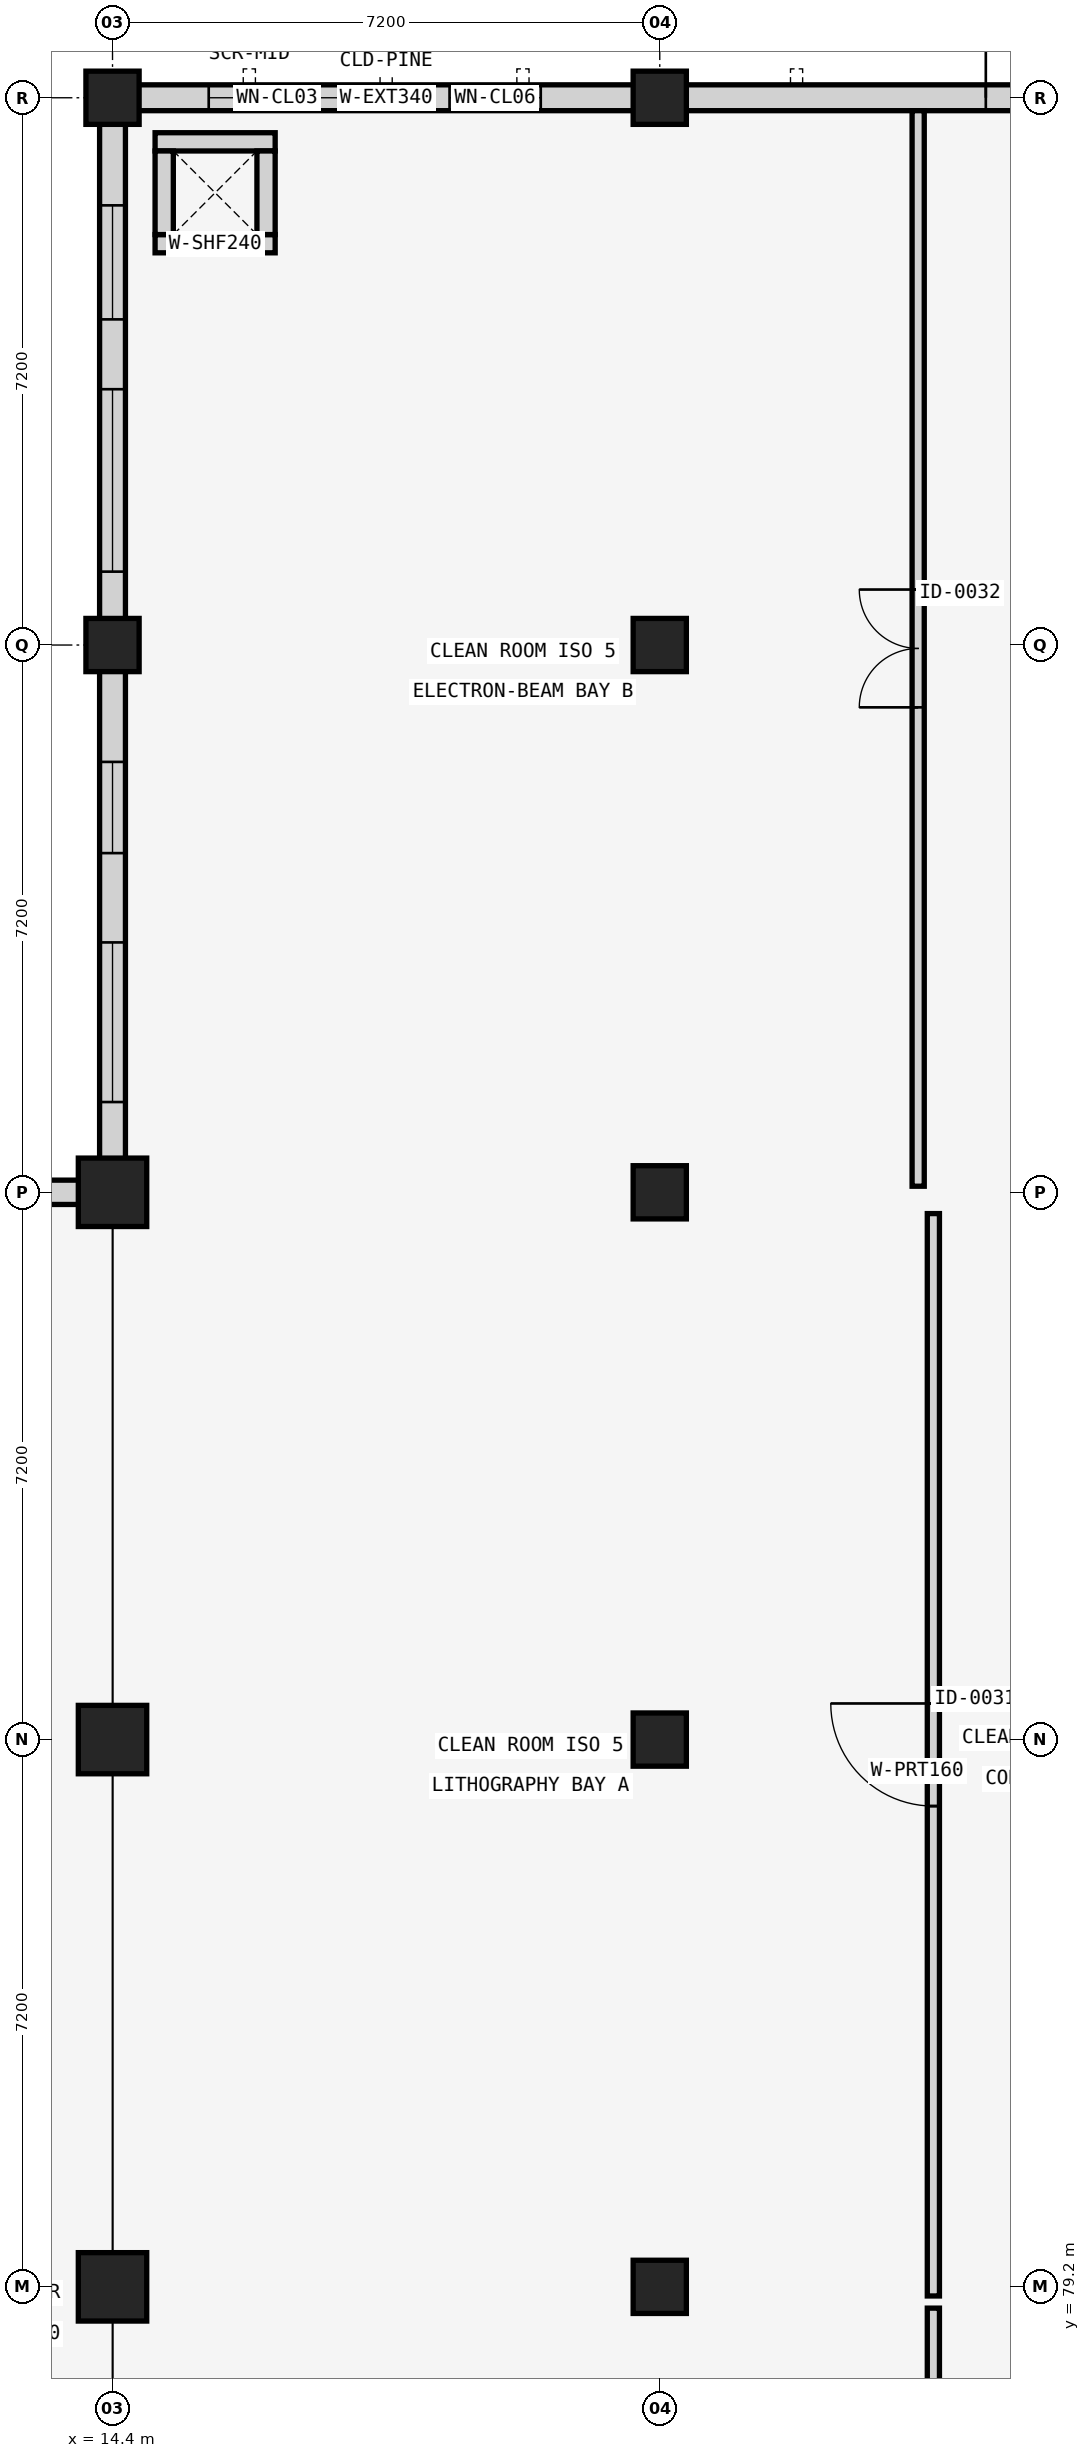
"""IFC4 building model, lengths in metres.
Left out: names, types, materials, properties, quantities, classifications, styles, units other than length and angle.
Written with IfcOpenShell. Run it as: python <this file> out.ifc"""

import sys

from ifc_helpers import new_model, si_unit, direction, frame, frame_2d, origin, origin_2d, place, context, subcontext, project, spatial, rectangle, extrude, element, fill, save


model = new_model("IFC4")
c1 = context("Model", 3, precision=1e-05, world=origin(), true_north=direction((0.0, 1.0)))
c2 = subcontext(c1, "Body", "Model", "MODEL_VIEW")
j1 = project(units=[si_unit("LENGTHUNIT", "METRE"), si_unit("PLANEANGLEUNIT", "RADIAN")], contexts=[c1])
p1 = place(None, origin())
s1 = spatial("IfcSite", under=j1, at=p1, CompositionType="ELEMENT")
p2 = place(p1, origin())
s2 = spatial("IfcBuilding", under=s1, at=p2, CompositionType="ELEMENT")
p3 = place(p2, origin())
s3 = spatial("IfcBuildingStorey", under=s2, at=p3, CompositionType="ELEMENT", Elevation=0.0)
for number, where, z_axis, x_axis in (
    (1, (14.4, 79.2, 0.0), (0.0, 0.0, 1.0), (1.0, 0.0, 0.0)),
    (2, (14.4, 86.4, 0.0), (0.0, 0.0, 1.0), (1.0, 0.0, 0.0)),
    (3, (14.4, 93.6, 0.0), (0.0, 0.0, 1.0), (1.0, 0.0, 0.0)),
):
    element("IfcColumn", number, at=place(p3, frame(where, z_axis=z_axis, x_axis=x_axis)), inside=s3, PredefinedType="COLUMN", context=c2, shape_type="SweptSolid", body=[
        extrude(rectangle(XDim=0.9, YDim=0.9, at=origin_2d()), origin(), (0.0, 0.0, 1.0), 4.8),
    ])
for number, where, z_axis, x_axis in (
    (4, (14.4, 100.8, 0.0), (0.0, 0.0, 1.0), (1.0, 0.0, 0.0)),
    (5, (14.4, 108.0, 0.0), (0.0, 0.0, 1.0), (1.0, 0.0, 0.0)),
    (6, (21.6, 79.2, 0.0), (0.0, 0.0, 1.0), (1.0, 0.0, 0.0)),
    (7, (21.6, 86.4, 0.0), (0.0, 0.0, 1.0), (1.0, 0.0, 0.0)),
    (8, (21.6, 93.6, 0.0), (0.0, 0.0, 1.0), (1.0, 0.0, 0.0)),
    (9, (21.6, 100.8, 0.0), (0.0, 0.0, 1.0), (1.0, 0.0, 0.0)),
    (10, (21.6, 108.0, 0.0), (0.0, 0.0, 1.0), (1.0, 0.0, 0.0)),
):
    element("IfcColumn", number, at=place(p3, frame(where, z_axis=z_axis, x_axis=x_axis)), inside=s3, PredefinedType="COLUMN", context=c2, shape_type="SweptSolid", body=[
        extrude(rectangle(XDim=0.7, YDim=0.7, at=origin_2d()), origin(), (0.0, 0.0, 1.0), 4.8),
    ])
p4 = place(p3, frame((1.8, 93.6, 0.0), z_axis=(0.0, 0.0, 1.0), x_axis=(1.0, 0.0, 0.0)))
e11 = element("IfcWall", 11, at=p4, inside=s3, PredefinedType="SOLIDWALL", context=c2, shape_type="SweptSolid", body=[
    extrude(rectangle(XDim=12.16, YDim=0.32, at=frame_2d((6.08, 0.0))), origin(), (0.0, 0.0, 1.0), 4.06),
])
p5 = place(p4, frame((2.975, 0.0, 0.9)))
e12 = element("IfcOpeningElement", 12, at=p5, cuts=e11, PredefinedType="OPENING", context=c2, shape_type="SweptSolid", body=[
    extrude(rectangle(XDim=0.45, YDim=2.4, at=frame_2d((0.225, 1.2))), frame((0.0, 0.17, 0.0), z_axis=(0.0, -1.0, 0.0), x_axis=(1.0, 0.0, 0.0)), (0.0, 0.0, 1.0), 0.34),
])
p6 = place(p4, frame((6.2, 0.0, 0.0)))
e13 = element("IfcOpeningElement", 13, at=p6, cuts=e11, PredefinedType="OPENING", context=c2, shape_type="SweptSolid", body=[
    extrude(rectangle(XDim=1.8, YDim=2.4, at=frame_2d((0.9, 1.2))), frame((0.0, 0.17, 0.0), z_axis=(0.0, -1.0, 0.0), x_axis=(1.0, 0.0, 0.0)), (0.0, 0.0, 1.0), 0.34),
])
p7 = place(p3, frame((14.74, 108.0, 0.0), z_axis=(0.0, 0.0, 1.0), x_axis=(1.0, 0.0, 0.0)))
e14 = element("IfcWall", 14, at=p7, inside=s3, PredefinedType="SOLIDWALL", context=c2, shape_type="SweptSolid", body=[
    extrude(rectangle(XDim=6.52, YDim=0.34, at=frame_2d((3.26, 0.0))), origin(), (0.0, 0.0, 1.0), 3.75),
])
p8 = place(p7, frame((0.926, 0.0, 1.0)))
e15 = element("IfcOpeningElement", 15, at=p8, cuts=e14, PredefinedType="OPENING", context=c2, shape_type="SweptSolid", body=[
    extrude(rectangle(XDim=1.8, YDim=1.5, at=frame_2d((0.9, 0.75))), frame((0.0, 0.18, 0.0), z_axis=(0.0, -1.0, 0.0), x_axis=(1.0, 0.0, 0.0)), (0.0, 0.0, 1.0), 0.36),
])
p9 = place(p7, frame((4.094, 0.0, 1.0)))
e16 = element("IfcOpeningElement", 16, at=p9, cuts=e14, PredefinedType="OPENING", context=c2, shape_type="SweptSolid", body=[
    extrude(rectangle(XDim=1.2, YDim=1.65, at=frame_2d((0.6, 0.825))), frame((0.0, 0.18, 0.0), z_axis=(0.0, -1.0, 0.0), x_axis=(1.0, 0.0, 0.0)), (0.0, 0.0, 1.0), 0.36),
])
p10 = place(p3, frame((21.94, 108.0, 0.0), z_axis=(0.0, 0.0, 1.0), x_axis=(1.0, 0.0, 0.0)))
e17 = element("IfcWall", 17, at=p10, inside=s3, PredefinedType="SOLIDWALL", context=c2, shape_type="SweptSolid", body=[
    extrude(rectangle(XDim=6.52, YDim=0.34, at=frame_2d((3.26, 0.0))), origin(), (0.0, 0.0, 1.0), 3.75),
])
p11 = place(p10, frame((3.95, 0.0, 0.0)))
e18 = element("IfcOpeningElement", 18, at=p11, cuts=e17, PredefinedType="OPENING", context=c2, shape_type="SweptSolid", body=[
    extrude(rectangle(XDim=1.8, YDim=2.4, at=frame_2d((0.9, 1.2))), frame((0.0, 0.18, 0.0), z_axis=(0.0, -1.0, 0.0), x_axis=(1.0, 0.0, 0.0)), (0.0, 0.0, 1.0), 0.36),
])
p12 = place(p3, frame((14.4, 94.04, 0.0), z_axis=(0.0, 0.0, 1.0), x_axis=(0.0, 1.0, 0.0)))
e19 = element("IfcWall", 19, at=p12, inside=s3, PredefinedType="SOLIDWALL", context=c2, shape_type="SweptSolid", body=[
    extrude(rectangle(XDim=6.42, YDim=0.34, at=frame_2d((3.21, 0.0))), origin(), (0.0, 0.0, 1.0), 3.85),
])
p13 = place(p12, frame((0.748, 0.0, 1.0)))
e20 = element("IfcOpeningElement", 20, at=p13, cuts=e19, PredefinedType="OPENING", context=c2, shape_type="SweptSolid", body=[
    extrude(rectangle(XDim=2.1, YDim=1.5, at=frame_2d((1.05, 0.75))), frame((0.0, 0.18, 0.0), z_axis=(0.0, -1.0, 0.0), x_axis=(1.0, 0.0, 0.0)), (0.0, 0.0, 1.0), 0.36),
])
p14 = place(p12, frame((4.022, 0.0, 1.0)))
e21 = element("IfcOpeningElement", 21, at=p14, cuts=e19, PredefinedType="OPENING", context=c2, shape_type="SweptSolid", body=[
    extrude(rectangle(XDim=1.2, YDim=1.65, at=frame_2d((0.6, 0.825))), frame((0.0, 0.18, 0.0), z_axis=(0.0, -1.0, 0.0), x_axis=(1.0, 0.0, 0.0)), (0.0, 0.0, 1.0), 0.36),
])
p15 = place(p3, frame((14.4, 101.14, 0.0), z_axis=(0.0, 0.0, 1.0), x_axis=(0.0, 1.0, 0.0)))
e22 = element("IfcWall", 22, at=p15, inside=s3, PredefinedType="SOLIDWALL", context=c2, shape_type="SweptSolid", body=[
    extrude(rectangle(XDim=6.52, YDim=0.34, at=frame_2d((3.26, 0.0))), origin(), (0.0, 0.0, 1.0), 3.85),
])
p16 = place(p15, frame((0.625, 0.0, 1.0)))
e23 = element("IfcOpeningElement", 23, at=p16, cuts=e22, PredefinedType="OPENING", context=c2, shape_type="SweptSolid", body=[
    extrude(rectangle(XDim=2.4, YDim=1.5, at=frame_2d((1.2, 0.75))), frame((0.0, 0.18, 0.0), z_axis=(0.0, -1.0, 0.0), x_axis=(1.0, 0.0, 0.0)), (0.0, 0.0, 1.0), 0.36),
])
p17 = place(p15, frame((3.944, 0.0, 1.0)))
e24 = element("IfcOpeningElement", 24, at=p17, cuts=e22, PredefinedType="OPENING", context=c2, shape_type="SweptSolid", body=[
    extrude(rectangle(XDim=1.5, YDim=1.65, at=frame_2d((0.75, 0.825))), frame((0.0, 0.18, 0.0), z_axis=(0.0, -1.0, 0.0), x_axis=(1.0, 0.0, 0.0)), (0.0, 0.0, 1.0), 0.36),
])
p18 = place(p3, frame((25.2, 65.08, 0.0), z_axis=(0.0, 0.0, 1.0), x_axis=(0.0, 1.0, 0.0)))
e25 = element("IfcWall", 25, at=p18, inside=s3, PredefinedType="PARTITIONING", context=c2, shape_type="SweptSolid", body=[
    extrude(rectangle(XDim=13.84, YDim=0.16, at=frame_2d((6.92, 0.0))), origin(), (0.0, 0.0, 1.0), 3.75),
])
p19 = place(p18, frame((6.32, 0.0, 0.0)))
e26 = element("IfcOpeningElement", 26, at=p19, cuts=e25, PredefinedType="OPENING", context=c2, shape_type="SweptSolid", body=[
    extrude(rectangle(XDim=1.2, YDim=2.15, at=frame_2d((0.6, 1.075))), frame((0.0, 0.09, 0.0), z_axis=(0.0, -1.0, 0.0), x_axis=(1.0, 0.0, 0.0)), (0.0, 0.0, 1.0), 0.18),
])
p20 = place(p3, frame((25.2, 79.08, 0.0), z_axis=(0.0, 0.0, 1.0), x_axis=(0.0, 1.0, 0.0)))
e27 = element("IfcWall", 27, at=p20, inside=s3, PredefinedType="PARTITIONING", context=c2, shape_type="SweptSolid", body=[
    extrude(rectangle(XDim=14.24, YDim=0.16, at=frame_2d((7.12, 0.0))), origin(), (0.0, 0.0, 1.0), 3.75),
])
p21 = place(p20, frame((6.445, 0.0, 0.0)))
e28 = element("IfcOpeningElement", 28, at=p21, cuts=e27, PredefinedType="OPENING", context=c2, shape_type="SweptSolid", body=[
    extrude(rectangle(XDim=1.35, YDim=2.2, at=frame_2d((0.675, 1.1))), frame((0.0, 0.09, 0.0), z_axis=(0.0, -1.0, 0.0), x_axis=(1.0, 0.0, 0.0)), (0.0, 0.0, 1.0), 0.18),
])
p22 = place(p3, frame((25.0, 93.68, 0.0), z_axis=(0.0, 0.0, 1.0), x_axis=(0.0, 1.0, 0.0)))
e29 = element("IfcWall", 29, at=p22, inside=s3, PredefinedType="PARTITIONING", context=c2, shape_type="SweptSolid", body=[
    extrude(rectangle(XDim=14.15, YDim=0.16, at=frame_2d((7.075, 0.0))), origin(), (0.0, 0.0, 1.0), 3.75),
])
p23 = place(p22, frame((6.3, 0.0, 0.0)))
e30 = element("IfcOpeningElement", 30, at=p23, cuts=e29, PredefinedType="OPENING", context=c2, shape_type="SweptSolid", body=[
    extrude(rectangle(XDim=1.55, YDim=2.25, at=frame_2d((0.775, 1.125))), frame((0.0, 0.09, 0.0), z_axis=(0.0, -1.0, 0.0), x_axis=(1.0, 0.0, 0.0)), (0.0, 0.0, 1.0), 0.18),
])
for number, where, z_axis, x_axis in (
    (31, (14.96, 106.08, 0.0), (0.0, 0.0, 1.0), (1.0, 0.0, 0.0)),
    (32, (14.96, 107.42, 0.0), (0.0, 0.0, 1.0), (1.0, 0.0, 0.0)),
):
    element("IfcWall", number, at=place(p3, frame(where, z_axis=z_axis, x_axis=x_axis)), inside=s3, PredefinedType="SOLIDWALL", context=c2, shape_type="SweptSolid", body=[
        extrude(rectangle(XDim=1.58, YDim=0.24, at=frame_2d((0.79, 0.0))), origin(), (0.0, 0.0, 1.0), 4.45),
    ])
for number, where, z_axis, x_axis in (
    (33, (15.08, 106.2, 0.0), (0.0, 0.0, 1.0), (0.0, 1.0, 0.0)),
    (34, (16.42, 106.2, 0.0), (0.0, 0.0, 1.0), (0.0, 1.0, 0.0)),
):
    element("IfcWall", number, at=place(p3, frame(where, z_axis=z_axis, x_axis=x_axis)), inside=s3, PredefinedType="SOLIDWALL", context=c2, shape_type="SweptSolid", body=[
        extrude(rectangle(XDim=1.1, YDim=0.24, at=frame_2d((0.55, 0.0))), origin(), (0.0, 0.0, 1.0), 4.45),
    ])
p24 = place(p8, origin())
e35 = element("IfcWindow", 35, at=p24, inside=s3, PartitioningType="SINGLE_PANEL", PredefinedType="WINDOW", context=c2, shape_type="SweptSolid", body=[
    extrude(rectangle(XDim=1.8, YDim=1.5, at=frame_2d((0.9, 0.75))), frame((0.0, 0.03, 0.0), z_axis=(0.0, -1.0, 0.0), x_axis=(1.0, 0.0, 0.0)), (0.0, 0.0, 1.0), 0.06),
])
fill(e15, e35)
p25 = place(p9, origin())
e36 = element("IfcWindow", 36, at=p25, inside=s3, PartitioningType="SINGLE_PANEL", PredefinedType="WINDOW", context=c2, shape_type="SweptSolid", body=[
    extrude(rectangle(XDim=1.2, YDim=1.65, at=frame_2d((0.6, 0.825))), frame((0.0, 0.03, 0.0), z_axis=(0.0, -1.0, 0.0), x_axis=(1.0, 0.0, 0.0)), (0.0, 0.0, 1.0), 0.06),
])
fill(e16, e36)
p26 = place(p11, origin())
e37 = element("IfcDoor", 37, at=p26, inside=s3, OperationType="DOUBLE_DOOR_SINGLE_SWING", PredefinedType="DOOR", context=c2, shape_type="SweptSolid", body=[
    extrude(rectangle(XDim=1.8, YDim=2.4, at=frame_2d((0.9, 1.2))), frame((0.0, 0.025, 0.0), z_axis=(0.0, -1.0, 0.0), x_axis=(1.0, 0.0, 0.0)), (0.0, 0.0, 1.0), 0.05),
])
fill(e18, e37)
p27 = place(p13, origin())
e38 = element("IfcWindow", 38, at=p27, inside=s3, PartitioningType="SINGLE_PANEL", PredefinedType="WINDOW", context=c2, shape_type="SweptSolid", body=[
    extrude(rectangle(XDim=2.1, YDim=1.5, at=frame_2d((1.05, 0.75))), frame((0.0, 0.03, 0.0), z_axis=(0.0, -1.0, 0.0), x_axis=(1.0, 0.0, 0.0)), (0.0, 0.0, 1.0), 0.06),
])
fill(e20, e38)
p28 = place(p14, origin())
e39 = element("IfcWindow", 39, at=p28, inside=s3, PartitioningType="SINGLE_PANEL", PredefinedType="WINDOW", context=c2, shape_type="SweptSolid", body=[
    extrude(rectangle(XDim=1.2, YDim=1.65, at=frame_2d((0.6, 0.825))), frame((0.0, 0.03, 0.0), z_axis=(0.0, -1.0, 0.0), x_axis=(1.0, 0.0, 0.0)), (0.0, 0.0, 1.0), 0.06),
])
fill(e21, e39)
p29 = place(p16, origin())
e40 = element("IfcWindow", 40, at=p29, inside=s3, PartitioningType="SINGLE_PANEL", PredefinedType="WINDOW", context=c2, shape_type="SweptSolid", body=[
    extrude(rectangle(XDim=2.4, YDim=1.5, at=frame_2d((1.2, 0.75))), frame((0.0, 0.03, 0.0), z_axis=(0.0, -1.0, 0.0), x_axis=(1.0, 0.0, 0.0)), (0.0, 0.0, 1.0), 0.06),
])
fill(e23, e40)
p30 = place(p17, origin())
e41 = element("IfcWindow", 41, at=p30, inside=s3, PartitioningType="SINGLE_PANEL", PredefinedType="WINDOW", context=c2, shape_type="SweptSolid", body=[
    extrude(rectangle(XDim=1.5, YDim=1.65, at=frame_2d((0.75, 0.825))), frame((0.0, 0.03, 0.0), z_axis=(0.0, -1.0, 0.0), x_axis=(1.0, 0.0, 0.0)), (0.0, 0.0, 1.0), 0.06),
])
fill(e24, e41)
p31 = place(p21, origin())
e42 = element("IfcDoor", 42, at=p31, inside=s3, OperationType="SINGLE_SWING_RIGHT", PredefinedType="DOOR", context=c2, shape_type="SweptSolid", body=[
    extrude(rectangle(XDim=1.35, YDim=2.2, at=frame_2d((0.675, 1.1))), frame((0.0, 0.025, 0.0), z_axis=(0.0, -1.0, 0.0), x_axis=(1.0, 0.0, 0.0)), (0.0, 0.0, 1.0), 0.05),
])
fill(e28, e42)
p32 = place(p23, origin())
e43 = element("IfcDoor", 43, at=p32, inside=s3, OperationType="DOUBLE_DOOR_SINGLE_SWING", PredefinedType="DOOR", context=c2, shape_type="SweptSolid", body=[
    extrude(rectangle(XDim=1.55, YDim=2.25, at=frame_2d((0.775, 1.125))), frame((0.0, 0.025, 0.0), z_axis=(0.0, -1.0, 0.0), x_axis=(1.0, 0.0, 0.0)), (0.0, 0.0, 1.0), 0.05),
])
fill(e30, e43)
save(model, sys.argv[1])
